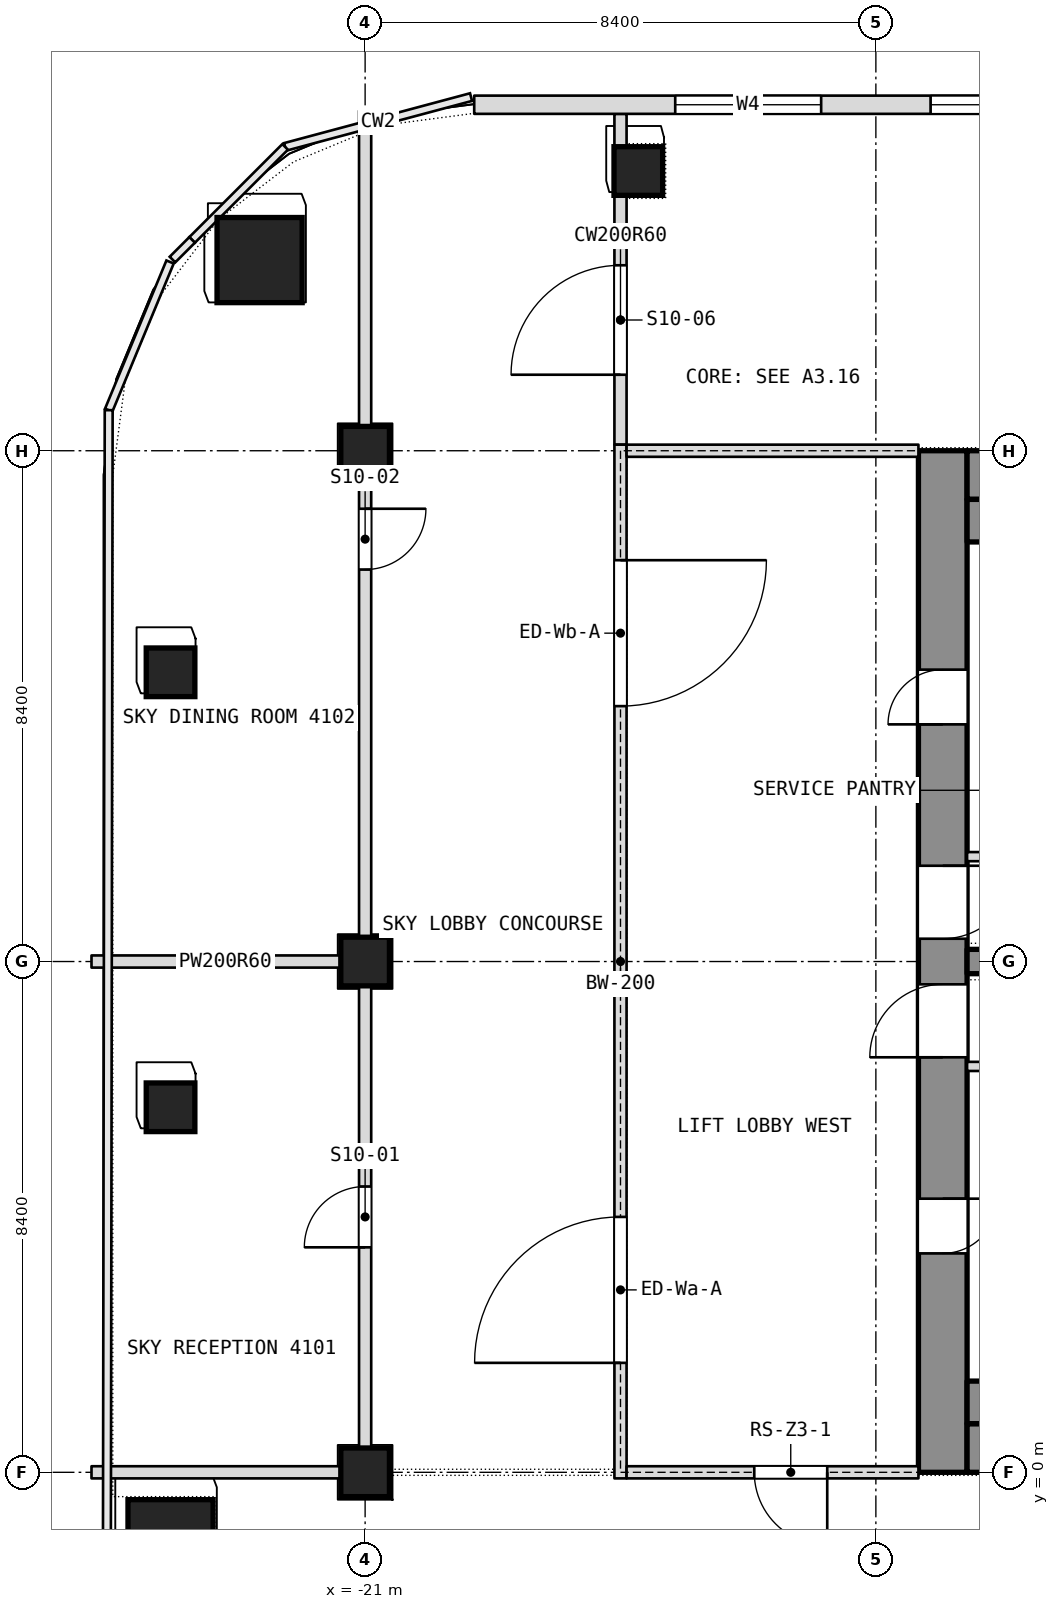
"""IFC4 building model, lengths in metres.
Left out: names, types, materials, properties, quantities, classifications, styles, units other than length and angle.
Written with IfcOpenShell. Run it as: python <this file> out.ifc"""

import sys

from ifc_helpers import new_model, si_unit, direction, frame, frame_2d, origin, origin_2d, place, context, subcontext, project, spatial, rectangle, extrude, element, fill, save


model = new_model("IFC4")
c1 = context("Model", 3, precision=1e-05, world=origin(), true_north=direction((0.0, 1.0)))
c2 = subcontext(c1, "Body", "Model", "MODEL_VIEW")
j1 = project(units=[si_unit("LENGTHUNIT", "METRE"), si_unit("PLANEANGLEUNIT", "RADIAN")], contexts=[c1])
p1 = place(None, origin())
s1 = spatial("IfcSite", under=j1, at=p1, CompositionType="ELEMENT")
p2 = place(p1, origin())
s2 = spatial("IfcBuilding", under=s1, at=p2, CompositionType="ELEMENT")
p3 = place(p2, frame((0.0, 0.0, 180.5)))
s3 = spatial("IfcBuildingStorey", under=s2, at=p3, CompositionType="ELEMENT", Elevation=180.5)
p4 = place(p3, frame((-11.5, 0.0, 0.0), z_axis=(0.0, 0.0, 1.0), x_axis=(0.0, 1.0, 0.0)))
e1 = element("IfcWall", 1, at=p4, inside=s3, PredefinedType="SHEAR", context=c2, shape_type="SweptSolid", body=[
    extrude(rectangle(XDim=16.8, YDim=0.8, at=frame_2d((8.4, 0.0))), origin(), (0.0, 0.0, 1.0), 7.2),
])
p5 = place(p4, frame((3.6, 0.0, 0.0)))
e2 = element("IfcOpeningElement", 2, at=p5, cuts=e1, PredefinedType="OPENING", context=c2, shape_type="SweptSolid", body=[
    extrude(rectangle(XDim=0.9, YDim=2.1, at=frame_2d((0.45, 1.05))), frame((0.0, 0.4, 0.0), z_axis=(0.0, -1.0, 0.0), x_axis=(1.0, 0.0, 0.0)), (0.0, 0.0, 1.0), 0.8),
])
p6 = place(p4, frame((6.825, 0.0, 0.0)))
e3 = element("IfcOpeningElement", 3, at=p6, cuts=e1, PredefinedType="OPENING", context=c2, shape_type="SweptSolid", body=[
    extrude(rectangle(XDim=1.2, YDim=2.1, at=frame_2d((0.6, 1.05))), frame((0.0, 0.4, 0.0), z_axis=(0.0, -1.0, 0.0), x_axis=(1.0, 0.0, 0.0)), (0.0, 0.0, 1.0), 0.8),
])
p7 = place(p4, frame((12.3, 0.0, 0.0)))
e4 = element("IfcOpeningElement", 4, at=p7, cuts=e1, PredefinedType="OPENING", context=c2, shape_type="SweptSolid", body=[
    extrude(rectangle(XDim=0.9, YDim=2.1, at=frame_2d((0.45, 1.05))), frame((0.0, 0.4, 0.0), z_axis=(0.0, -1.0, 0.0), x_axis=(1.0, 0.0, 0.0)), (0.0, 0.0, 1.0), 0.8),
])
p8 = place(p4, frame((8.775, 0.0, 0.0)))
e5 = element("IfcOpeningElement", 5, at=p8, cuts=e1, PredefinedType="OPENING", context=c2, shape_type="SweptSolid", body=[
    extrude(rectangle(XDim=1.2, YDim=2.1, at=frame_2d((0.6, 1.05))), frame((0.0, 0.4, 0.0), z_axis=(0.0, -1.0, 0.0), x_axis=(1.0, 0.0, 0.0)), (0.0, 0.0, 1.0), 0.8),
])
for number, where, z_axis, x_axis in (
    (6, (-11.1, 0.4, 0.0), (0.0, 0.0, 1.0), (1.0, 0.0, 0.0)),
    (7, (-11.1, 16.4, 0.0), (0.0, 0.0, 1.0), (1.0, 0.0, 0.0)),
):
    element("IfcWall", number, at=place(p3, frame(where, z_axis=z_axis, x_axis=x_axis)), inside=s3, PredefinedType="SHEAR", context=c2, shape_type="SweptSolid", body=[
        extrude(rectangle(XDim=22.2, YDim=0.8, at=frame_2d((11.1, 0.0))), origin(), (0.0, 0.0, 1.0), 7.2),
    ])
p9 = place(p3, frame((-11.1, 8.4, 0.0), z_axis=(0.0, 0.0, 1.0), x_axis=(1.0, 0.0, 0.0)))
e8 = element("IfcWall", 8, at=p9, inside=s3, PredefinedType="SHEAR", context=c2, shape_type="SweptSolid", body=[
    extrude(rectangle(XDim=6.7, YDim=0.4, at=frame_2d((3.35, 0.0))), origin(), (0.0, 0.0, 1.0), 7.2),
])
for number, where, z_axis, x_axis in (
    (9, (-22.736, 19.936, 0.0), (0.0, 0.0, 1.0), (1.0, 0.0, 0.0)),
    (10, (-24.2, -1.15, 0.0), (0.0, 0.0, 1.0), (1.0, 0.0, 0.0)),
):
    element("IfcColumn", number, at=place(p3, frame(where, z_axis=z_axis, x_axis=x_axis)), inside=s3, PredefinedType="COLUMN", context=c2, shape_type="SweptSolid", body=[
        extrude(rectangle(XDim=1.4, YDim=1.4, at=origin_2d()), origin(), (0.0, 0.0, 1.0), 7.2),
    ])
for number, where, z_axis, x_axis in (
    (11, (-21.0, 0.0, 0.0), (0.0, 0.0, 1.0), (1.0, 0.0, 0.0)),
    (12, (-21.0, 8.4, 0.0), (0.0, 0.0, 1.0), (1.0, 0.0, 0.0)),
    (13, (-21.0, 16.8, 0.0), (0.0, 0.0, 1.0), (1.0, 0.0, 0.0)),
    (14, (-24.2, 6.003, 0.0), (0.0, 0.0, 1.0), (1.0, 0.0, 0.0)),
    (15, (-24.2, 13.156, 0.0), (0.0, 0.0, 1.0), (1.0, 0.0, 0.0)),
    (16, (-16.507, 21.4, 0.0), (0.0, 0.0, 1.0), (1.0, 0.0, 0.0)),
):
    element("IfcColumn", number, at=place(p3, frame(where, z_axis=z_axis, x_axis=x_axis)), inside=s3, PredefinedType="COLUMN", context=c2, shape_type="SweptSolid", body=[
        extrude(rectangle(XDim=0.8, YDim=0.8, at=origin_2d()), origin(), (0.0, 0.0, 1.0), 7.2),
    ])
for number, where, z_axis, x_axis in (
    (17, (-25.5, 0.0, 0.0), (0.0, 0.0, 1.0), (1.0, 0.0, 0.0)),
    (18, (-25.5, 8.4, 0.0), (0.0, 0.0, 1.0), (1.0, 0.0, 0.0)),
):
    element("IfcWall", number, at=place(p3, frame(where, z_axis=z_axis, x_axis=x_axis)), inside=s3, PredefinedType="PARTITIONING", context=c2, shape_type="SweptSolid", body=[
        extrude(rectangle(XDim=4.4, YDim=0.2, at=frame_2d((2.2, 0.0))), origin(), (0.0, 0.0, 1.0), 6.54),
    ])
p10 = place(p3, frame((-16.8, 16.9, 0.0), z_axis=(0.0, 0.0, 1.0), x_axis=(0.0, 1.0, 0.0)))
e19 = element("IfcWall", 19, at=p10, inside=s3, PredefinedType="PARTITIONING", context=c2, shape_type="SweptSolid", body=[
    extrude(rectangle(XDim=4.1, YDim=0.2, at=frame_2d((2.05, 0.0))), origin(), (0.0, 0.0, 1.0), 6.94),
])
p11 = place(p10, frame((1.15, 0.0, 0.0)))
e20 = element("IfcOpeningElement", 20, at=p11, cuts=e19, PredefinedType="OPENING", context=c2, shape_type="SweptSolid", body=[
    extrude(rectangle(XDim=1.8, YDim=2.1, at=frame_2d((0.9, 1.05))), frame((0.0, 0.1, 0.0), z_axis=(0.0, -1.0, 0.0), x_axis=(1.0, 0.0, 0.0)), (0.0, 0.0, 1.0), 0.2),
])
p12 = place(p3, frame((-16.8, 21.8, 0.0), z_axis=(0.0, 0.0, 1.0), x_axis=(0.0, 1.0, 0.0)))
e21 = element("IfcWall", 21, at=p12, inside=s3, PredefinedType="PARTITIONING", context=c2, shape_type="SweptSolid", body=[
    extrude(rectangle(XDim=0.54, YDim=0.2, at=frame_2d((0.27, 0.0))), origin(), (0.0, 0.0, 1.0), 6.94),
])
p13 = place(p3, frame((-21.0, -0.1, 0.0), z_axis=(0.0, 0.0, 1.0), x_axis=(0.0, 1.0, 0.0)))
e22 = element("IfcWall", 22, at=p13, inside=s3, PredefinedType="PARTITIONING", context=c2, shape_type="SweptSolid", body=[
    extrude(rectangle(XDim=22.493, YDim=0.2, at=frame_2d((11.247, 0.0))), origin(), (0.0, 0.0, 1.0), 6.94),
])
p14 = place(p13, frame((3.8, 0.0, 0.0)))
e23 = element("IfcOpeningElement", 23, at=p14, cuts=e22, PredefinedType="OPENING", context=c2, shape_type="SweptSolid", body=[
    extrude(rectangle(XDim=1.0, YDim=2.1, at=frame_2d((0.5, 1.05))), frame((0.0, 0.1, 0.0), z_axis=(0.0, -1.0, 0.0), x_axis=(1.0, 0.0, 0.0)), (0.0, 0.0, 1.0), 0.2),
])
p15 = place(p13, frame((14.946, 0.0, 0.0)))
e24 = element("IfcOpeningElement", 24, at=p15, cuts=e22, PredefinedType="OPENING", context=c2, shape_type="SweptSolid", body=[
    extrude(rectangle(XDim=1.0, YDim=2.1, at=frame_2d((0.5, 1.05))), frame((0.0, 0.1, 0.0), z_axis=(0.0, -1.0, 0.0), x_axis=(1.0, 0.0, 0.0)), (0.0, 0.0, 1.0), 0.2),
])
p16 = place(p3, frame((19.206, 22.49, 0.0), z_axis=(0.0, 0.0, 1.0), x_axis=(-1.0, 0.0, 0.0)))
e25 = element("IfcWall", 25, at=p16, inside=s3, PredefinedType="NOTDEFINED", context=c2, shape_type="SweptSolid", body=[
    extrude(rectangle(XDim=38.412, YDim=0.3, at=frame_2d((19.206, 0.0))), origin(), (0.0, 0.0, 1.0), 7.2),
])
p17 = place(p16, frame((3.306, 0.0, 0.9)))
e26 = element("IfcOpeningElement", 26, at=p17, cuts=e25, PredefinedType="OPENING", context=c2, shape_type="SweptSolid", body=[
    extrude(rectangle(XDim=2.4, YDim=4.5, at=frame_2d((1.2, 2.25))), frame((0.0, 0.15, 0.0), z_axis=(0.0, -1.0, 0.0), x_axis=(1.0, 0.0, 0.0)), (0.0, 0.0, 1.0), 0.3),
])
p18 = place(p16, frame((7.506, 0.0, 0.9)))
e27 = element("IfcOpeningElement", 27, at=p18, cuts=e25, PredefinedType="OPENING", context=c2, shape_type="SweptSolid", body=[
    extrude(rectangle(XDim=2.4, YDim=4.5, at=frame_2d((1.2, 2.25))), frame((0.0, 0.15, 0.0), z_axis=(0.0, -1.0, 0.0), x_axis=(1.0, 0.0, 0.0)), (0.0, 0.0, 1.0), 0.3),
])
p19 = place(p16, frame((11.706, 0.0, 0.9)))
e28 = element("IfcOpeningElement", 28, at=p19, cuts=e25, PredefinedType="OPENING", context=c2, shape_type="SweptSolid", body=[
    extrude(rectangle(XDim=2.4, YDim=4.5, at=frame_2d((1.2, 2.25))), frame((0.0, 0.15, 0.0), z_axis=(0.0, -1.0, 0.0), x_axis=(1.0, 0.0, 0.0)), (0.0, 0.0, 1.0), 0.3),
])
p20 = place(p16, frame((15.906, 0.0, 0.9)))
e29 = element("IfcOpeningElement", 29, at=p20, cuts=e25, PredefinedType="OPENING", context=c2, shape_type="SweptSolid", body=[
    extrude(rectangle(XDim=2.4, YDim=4.5, at=frame_2d((1.2, 2.25))), frame((0.0, 0.15, 0.0), z_axis=(0.0, -1.0, 0.0), x_axis=(1.0, 0.0, 0.0)), (0.0, 0.0, 1.0), 0.3),
])
p21 = place(p16, frame((20.106, 0.0, 0.9)))
e30 = element("IfcOpeningElement", 30, at=p21, cuts=e25, PredefinedType="OPENING", context=c2, shape_type="SweptSolid", body=[
    extrude(rectangle(XDim=2.4, YDim=4.5, at=frame_2d((1.2, 2.25))), frame((0.0, 0.15, 0.0), z_axis=(0.0, -1.0, 0.0), x_axis=(1.0, 0.0, 0.0)), (0.0, 0.0, 1.0), 0.3),
])
p22 = place(p16, frame((24.306, 0.0, 0.9)))
e31 = element("IfcOpeningElement", 31, at=p22, cuts=e25, PredefinedType="OPENING", context=c2, shape_type="SweptSolid", body=[
    extrude(rectangle(XDim=2.4, YDim=4.5, at=frame_2d((1.2, 2.25))), frame((0.0, 0.15, 0.0), z_axis=(0.0, -1.0, 0.0), x_axis=(1.0, 0.0, 0.0)), (0.0, 0.0, 1.0), 0.3),
])
p23 = place(p16, frame((28.506, 0.0, 0.9)))
e32 = element("IfcOpeningElement", 32, at=p23, cuts=e25, PredefinedType="OPENING", context=c2, shape_type="SweptSolid", body=[
    extrude(rectangle(XDim=2.4, YDim=4.5, at=frame_2d((1.2, 2.25))), frame((0.0, 0.15, 0.0), z_axis=(0.0, -1.0, 0.0), x_axis=(1.0, 0.0, 0.0)), (0.0, 0.0, 1.0), 0.3),
])
p24 = place(p16, frame((32.706, 0.0, 0.9)))
e33 = element("IfcOpeningElement", 33, at=p24, cuts=e25, PredefinedType="OPENING", context=c2, shape_type="SweptSolid", body=[
    extrude(rectangle(XDim=2.4, YDim=4.5, at=frame_2d((1.2, 2.25))), frame((0.0, 0.15, 0.0), z_axis=(0.0, -1.0, 0.0), x_axis=(1.0, 0.0, 0.0)), (0.0, 0.0, 1.0), 0.3),
])
for number, where, z_axis, x_axis in (
    (34, (-11.1, 1.15, 0.0), (0.0, 0.0, 1.0), (1.0, 0.0, 0.0)),
    (35, (-11.1, 15.65, 0.0), (0.0, 0.0, 1.0), (1.0, 0.0, 0.0)),
):
    element("IfcWall", number, at=place(p3, frame(where, z_axis=z_axis, x_axis=x_axis)), inside=s3, PredefinedType="PARTITIONING", context=c2, shape_type="SweptSolid", body=[
        extrude(rectangle(XDim=22.2, YDim=0.7, at=frame_2d((11.1, 0.0))), origin(), (0.0, 0.0, 1.0), 6.94),
    ])
for number, where, z_axis, x_axis in (
    (36, (-11.1, 6.675, 0.0), (0.0, 0.0, 1.0), (1.0, 0.0, 0.0)),
    (37, (-11.1, 10.125, 0.0), (0.0, 0.0, 1.0), (1.0, 0.0, 0.0)),
):
    element("IfcWall", number, at=place(p3, frame(where, z_axis=z_axis, x_axis=x_axis)), inside=s3, PredefinedType="PARTITIONING", context=c2, shape_type="SweptSolid", body=[
        extrude(rectangle(XDim=2.1, YDim=0.15, at=frame_2d((1.05, 0.0))), origin(), (0.0, 0.0, 1.0), 6.94),
    ])
p25 = place(p3, frame((-16.8, -0.1, 0.0), z_axis=(0.0, 0.0, 1.0), x_axis=(0.0, 1.0, 0.0)))
e38 = element("IfcWall", 38, at=p25, inside=s3, PredefinedType="PARTITIONING", context=c2, shape_type="SweptSolid", body=[
    extrude(rectangle(XDim=17.0, YDim=0.2, at=frame_2d((8.5, 0.0))), origin(), (0.0, 0.0, 1.0), 6.94),
])
p26 = place(p25, frame((1.9, 0.0, 0.0)))
e39 = element("IfcOpeningElement", 39, at=p26, cuts=e38, PredefinedType="OPENING", context=c2, shape_type="SweptSolid", body=[
    extrude(rectangle(XDim=2.4, YDim=2.1, at=frame_2d((1.2, 1.05))), frame((0.0, 0.1, 0.0), z_axis=(0.0, -1.0, 0.0), x_axis=(1.0, 0.0, 0.0)), (0.0, 0.0, 1.0), 0.2),
])
p27 = place(p25, frame((12.7, 0.0, 0.0)))
e40 = element("IfcOpeningElement", 40, at=p27, cuts=e38, PredefinedType="OPENING", context=c2, shape_type="SweptSolid", body=[
    extrude(rectangle(XDim=2.4, YDim=2.1, at=frame_2d((1.2, 1.05))), frame((0.0, 0.1, 0.0), z_axis=(0.0, -1.0, 0.0), x_axis=(1.0, 0.0, 0.0)), (0.0, 0.0, 1.0), 0.2),
])
p28 = place(p3, frame((-16.7, 0.0, 0.0), z_axis=(0.0, 0.0, 1.0), x_axis=(1.0, 0.0, 0.0)))
e41 = element("IfcWall", 41, at=p28, inside=s3, PredefinedType="PARTITIONING", context=c2, shape_type="SweptSolid", body=[
    extrude(rectangle(XDim=4.8, YDim=0.2, at=frame_2d((2.4, 0.0))), origin(), (0.0, 0.0, 1.0), 6.54),
])
p29 = place(p28, frame((2.1, 0.0, 0.0)))
e42 = element("IfcOpeningElement", 42, at=p29, cuts=e41, PredefinedType="OPENING", context=c2, shape_type="SweptSolid", body=[
    extrude(rectangle(XDim=1.2, YDim=2.1, at=frame_2d((0.6, 1.05))), frame((0.0, 0.1, 0.0), z_axis=(0.0, -1.0, 0.0), x_axis=(1.0, 0.0, 0.0)), (0.0, 0.0, 1.0), 0.2),
])
p30 = place(p3, frame((-16.7, 16.8, 0.0), z_axis=(0.0, 0.0, 1.0), x_axis=(1.0, 0.0, 0.0)))
e43 = element("IfcWall", 43, at=p30, inside=s3, PredefinedType="PARTITIONING", context=c2, shape_type="SweptSolid", body=[
    extrude(rectangle(XDim=4.8, YDim=0.2, at=frame_2d((2.4, 0.0))), origin(), (0.0, 0.0, 1.0), 6.54),
])
p31 = place(p11, origin())
e44 = element("IfcDoor", 44, at=p31, inside=s3, OperationType="DOUBLE_DOOR_SINGLE_SWING", PredefinedType="DOOR", context=c2, shape_type="SweptSolid", body=[
    extrude(rectangle(XDim=1.8, YDim=2.1, at=frame_2d((0.9, 1.05))), frame((0.0, 0.025, 0.0), z_axis=(0.0, -1.0, 0.0), x_axis=(1.0, 0.0, 0.0)), (0.0, 0.0, 1.0), 0.05),
])
fill(e20, e44)
p32 = place(p14, origin())
e45 = element("IfcDoor", 45, at=p32, inside=s3, OperationType="SINGLE_SWING_LEFT", PredefinedType="DOOR", context=c2, shape_type="SweptSolid", body=[
    extrude(rectangle(XDim=1.0, YDim=2.1, at=frame_2d((0.5, 1.05))), frame((0.0, 0.025, 0.0), z_axis=(0.0, -1.0, 0.0), x_axis=(1.0, 0.0, 0.0)), (0.0, 0.0, 1.0), 0.05),
])
fill(e23, e45)
p33 = place(p15, origin())
e46 = element("IfcDoor", 46, at=p33, inside=s3, OperationType="SINGLE_SWING_LEFT", PredefinedType="DOOR", context=c2, shape_type="SweptSolid", body=[
    extrude(rectangle(XDim=1.0, YDim=2.1, at=frame_2d((0.5, 1.05))), frame((0.0, 0.025, 0.0), z_axis=(0.0, -1.0, 0.0), x_axis=(1.0, 0.0, 0.0)), (0.0, 0.0, 1.0), 0.05),
])
fill(e24, e46)
p34 = place(p23, origin())
e47 = element("IfcWindow", 47, at=p34, inside=s3, PartitioningType="SINGLE_PANEL", PredefinedType="WINDOW", context=c2, shape_type="SweptSolid", body=[
    extrude(rectangle(XDim=2.4, YDim=4.5, at=frame_2d((1.2, 2.25))), frame((0.0, 0.03, 0.0), z_axis=(0.0, -1.0, 0.0), x_axis=(1.0, 0.0, 0.0)), (0.0, 0.0, 1.0), 0.06),
])
fill(e32, e47)
p35 = place(p24, origin())
e48 = element("IfcWindow", 48, at=p35, inside=s3, PartitioningType="SINGLE_PANEL", PredefinedType="WINDOW", context=c2, shape_type="SweptSolid", body=[
    extrude(rectangle(XDim=2.4, YDim=4.5, at=frame_2d((1.2, 2.25))), frame((0.0, 0.03, 0.0), z_axis=(0.0, -1.0, 0.0), x_axis=(1.0, 0.0, 0.0)), (0.0, 0.0, 1.0), 0.06),
])
fill(e33, e48)
p36 = place(p5, origin())
e49 = element("IfcDoor", 49, at=p36, inside=s3, OperationType="SINGLE_SWING_LEFT", PredefinedType="DOOR", context=c2, shape_type="SweptSolid", body=[
    extrude(rectangle(XDim=0.9, YDim=2.1, at=frame_2d((0.45, 1.05))), frame((0.0, 0.025, 0.0), z_axis=(0.0, -1.0, 0.0), x_axis=(1.0, 0.0, 0.0)), (0.0, 0.0, 1.0), 0.05),
])
fill(e2, e49)
p37 = place(p6, origin())
e50 = element("IfcDoor", 50, at=p37, inside=s3, OperationType="SINGLE_SWING_LEFT", PredefinedType="DOOR", context=c2, shape_type="SweptSolid", body=[
    extrude(rectangle(XDim=1.2, YDim=2.1, at=frame_2d((0.6, 1.05))), frame((0.0, 0.025, 0.0), z_axis=(0.0, -1.0, 0.0), x_axis=(1.0, 0.0, 0.0)), (0.0, 0.0, 1.0), 0.05),
])
fill(e3, e50)
p38 = place(p7, origin())
e51 = element("IfcDoor", 51, at=p38, inside=s3, OperationType="SINGLE_SWING_LEFT", PredefinedType="DOOR", context=c2, shape_type="SweptSolid", body=[
    extrude(rectangle(XDim=0.9, YDim=2.1, at=frame_2d((0.45, 1.05))), frame((0.0, 0.025, 0.0), z_axis=(0.0, -1.0, 0.0), x_axis=(1.0, 0.0, 0.0)), (0.0, 0.0, 1.0), 0.05),
])
fill(e4, e51)
p39 = place(p8, origin())
e52 = element("IfcDoor", 52, at=p39, inside=s3, OperationType="SINGLE_SWING_LEFT", PredefinedType="DOOR", context=c2, shape_type="SweptSolid", body=[
    extrude(rectangle(XDim=1.2, YDim=2.1, at=frame_2d((0.6, 1.05))), frame((0.0, 0.025, 0.0), z_axis=(0.0, -1.0, 0.0), x_axis=(1.0, 0.0, 0.0)), (0.0, 0.0, 1.0), 0.05),
])
fill(e5, e52)
p40 = place(p26, origin())
e53 = element("IfcDoor", 53, at=p40, inside=s3, OperationType="DOUBLE_DOOR_SINGLE_SWING", PredefinedType="DOOR", context=c2, shape_type="SweptSolid", body=[
    extrude(rectangle(XDim=2.4, YDim=2.1, at=frame_2d((1.2, 1.05))), frame((0.0, 0.025, 0.0), z_axis=(0.0, -1.0, 0.0), x_axis=(1.0, 0.0, 0.0)), (0.0, 0.0, 1.0), 0.05),
])
fill(e39, e53)
p41 = place(p27, origin())
e54 = element("IfcDoor", 54, at=p41, inside=s3, OperationType="DOUBLE_DOOR_SINGLE_SWING", PredefinedType="DOOR", context=c2, shape_type="SweptSolid", body=[
    extrude(rectangle(XDim=2.4, YDim=2.1, at=frame_2d((1.2, 1.05))), frame((0.0, 0.025, 0.0), z_axis=(0.0, -1.0, 0.0), x_axis=(1.0, 0.0, 0.0)), (0.0, 0.0, 1.0), 0.05),
])
fill(e40, e54)
p42 = place(p29, origin())
e55 = element("IfcDoor", 55, at=p42, inside=s3, OperationType="SINGLE_SWING_LEFT", PredefinedType="DOOR", context=c2, shape_type="SweptSolid", body=[
    extrude(rectangle(XDim=1.2, YDim=2.1, at=frame_2d((0.6, 1.05))), frame((0.0, 0.025, 0.0), z_axis=(0.0, -1.0, 0.0), x_axis=(1.0, 0.0, 0.0)), (0.0, 0.0, 1.0), 0.05),
])
fill(e42, e55)
save(model, sys.argv[1])
